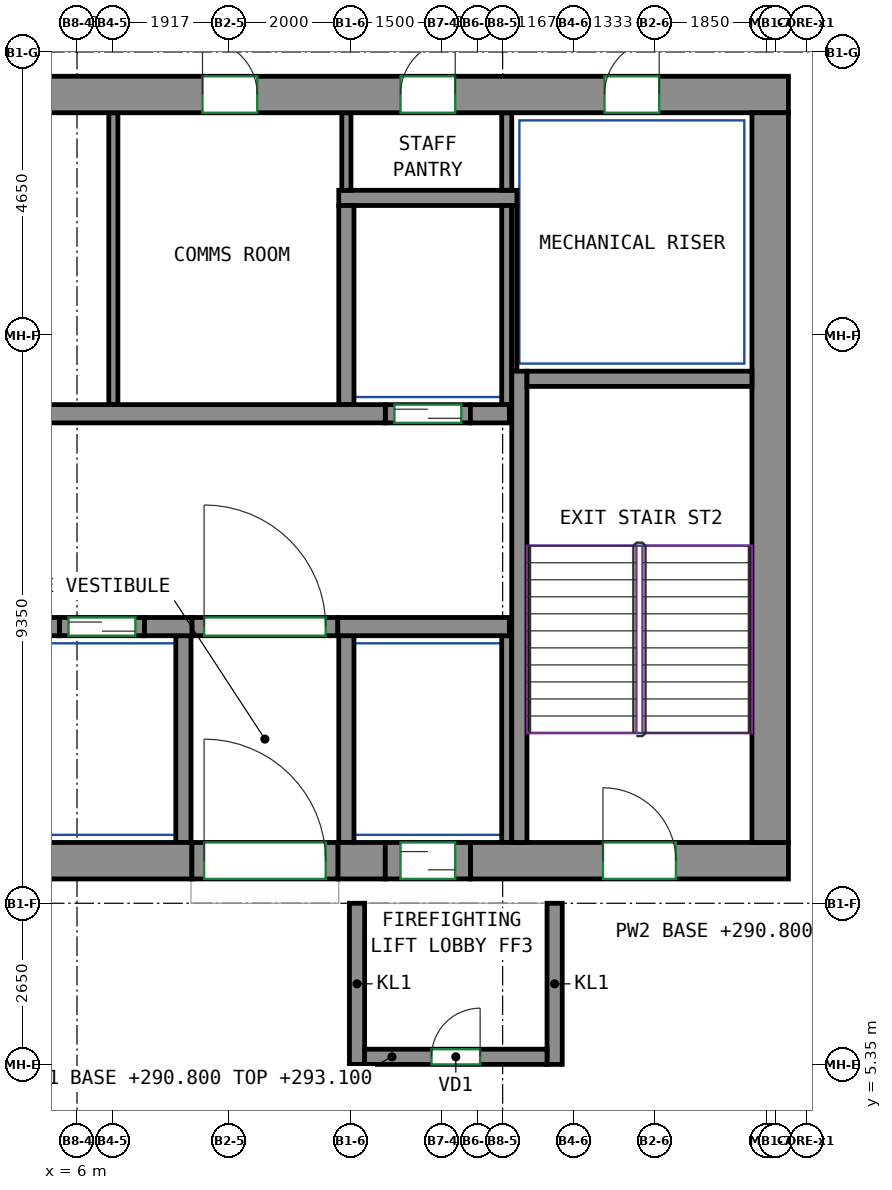
"""IFC4 building model, lengths in metres.
Left out: names, types, materials, properties, quantities, classifications, styles, units other than length and angle.
Written with IfcOpenShell. Run it as: python <this file> out.ifc"""

import sys

from ifc_helpers import new_model, si_unit, direction, frame, frame_2d, origin, place, context, subcontext, project, spatial, rectangle, extrude, source, transform, mapped, element, fill, save


model = new_model("IFC4")
c1 = context("Model", 3, precision=1e-05, world=origin(), true_north=direction((0.0, 1.0)))
c2 = subcontext(c1, "Body", "Model", "MODEL_VIEW")
j1 = project(units=[si_unit("LENGTHUNIT", "METRE"), si_unit("PLANEANGLEUNIT", "RADIAN")], contexts=[c1])
p1 = place(None, origin())
s1 = spatial("IfcSite", under=j1, at=p1, CompositionType="ELEMENT")
p2 = place(p1, origin())
s2 = spatial("IfcBuilding", under=s1, at=p2, CompositionType="ELEMENT")
p3 = place(p2, frame((0.0, 0.0, 290.8)))
s3 = spatial("IfcBuildingStorey", under=s2, at=p3, CompositionType="ELEMENT", Elevation=290.8)
m1 = source(origin(), c2, "Body", "SweptSolid", [
    extrude(rectangle(XDim=14.18, YDim=0.6, at=frame_2d((7.09, 0.0))), origin(), (0.0, 0.0, 1.0), 3.8),
])
p4 = place(p3, frame((-6.29, 8.7, 0.0), z_axis=(0.0, 0.0, 1.0), x_axis=(1.0, 0.0, 0.0)))
e1 = element("IfcWall", 1, at=p4, inside=s3, PredefinedType="SHEAR", context=c2, shape_type="MappedRepresentation", body=[
    mapped(m1, transform((0.0, 0.0, 0.0))),
])
m2 = source(origin(), c2, "Body", "SweptSolid", [
    extrude(rectangle(XDim=0.78, YDim=0.6, at=frame_2d((0.39, 0.0))), origin(), (0.0, 0.0, 1.0), 3.8),
])
p5 = place(p3, frame((10.29, 8.7, 0.0), z_axis=(0.0, 0.0, 1.0), x_axis=(1.0, 0.0, 0.0)))
e2 = element("IfcWall", 2, at=p5, inside=s3, PredefinedType="SHEAR", context=c2, shape_type="MappedRepresentation", body=[
    mapped(m2, transform((0.0, 0.0, 0.0))),
])
m3 = source(origin(), c2, "Body", "SweptSolid", [
    extrude(rectangle(XDim=5.23, YDim=0.6, at=frame_2d((2.615, 0.0))), origin(), (0.0, 0.0, 1.0), 3.8),
])
p6 = place(p3, frame((12.47, 8.7, 0.0), z_axis=(0.0, 0.0, 1.0), x_axis=(1.0, 0.0, 0.0)))
e3 = element("IfcWall", 3, at=p6, inside=s3, PredefinedType="SHEAR", context=c2, shape_type="MappedRepresentation", body=[
    mapped(m3, transform((0.0, 0.0, 0.0))),
])
p7 = place(p6, frame((2.18, 0.0, 0.0)))
e4 = element("IfcOpeningElement", 4, at=p7, cuts=e3, PredefinedType="OPENING", context=c2, shape_type="SweptSolid", body=[
    extrude(rectangle(XDim=1.2, YDim=2.1, at=frame_2d((0.6, 1.05))), frame((0.0, 0.31, 0.0), z_axis=(0.0, -1.0, 0.0), x_axis=(1.0, 0.0, 0.0)), (0.0, 0.0, 1.0), 0.62),
])
m4 = source(origin(), c2, "Body", "SweptSolid", [
    extrude(rectangle(XDim=33.3, YDim=0.6, at=frame_2d((16.65, 0.0))), origin(), (0.0, 0.0, 1.0), 3.8),
])
p8 = place(p3, frame((-15.6, 21.3, 0.0), z_axis=(0.0, 0.0, 1.0), x_axis=(1.0, 0.0, 0.0)))
e5 = element("IfcWall", 5, at=p8, inside=s3, PredefinedType="SHEAR", context=c2, shape_type="MappedRepresentation", body=[
    mapped(m4, transform((0.0, 0.0, 0.0))),
])
p9 = place(p8, frame((8.12, 0.0, 0.0)))
e6 = element("IfcOpeningElement", 6, at=p9, cuts=e5, PredefinedType="OPENING", context=c2, shape_type="SweptSolid", body=[
    extrude(rectangle(XDim=0.9, YDim=2.1, at=frame_2d((0.45, 1.05))), frame((0.0, 0.31, 0.0), z_axis=(0.0, -1.0, 0.0), x_axis=(1.0, 0.0, 0.0)), (0.0, 0.0, 1.0), 0.62),
])
p10 = place(p8, frame((14.15, 0.0, 0.0)))
e7 = element("IfcOpeningElement", 7, at=p10, cuts=e5, PredefinedType="OPENING", context=c2, shape_type="SweptSolid", body=[
    extrude(rectangle(XDim=0.9, YDim=2.1, at=frame_2d((0.45, 1.05))), frame((0.0, 0.31, 0.0), z_axis=(0.0, -1.0, 0.0), x_axis=(1.0, 0.0, 0.0)), (0.0, 0.0, 1.0), 0.62),
])
p11 = place(p8, frame((18.974, 0.0, 0.0)))
e8 = element("IfcOpeningElement", 8, at=p11, cuts=e5, PredefinedType="OPENING", context=c2, shape_type="SweptSolid", body=[
    extrude(rectangle(XDim=0.9, YDim=2.1, at=frame_2d((0.45, 1.05))), frame((0.0, 0.31, 0.0), z_axis=(0.0, -1.0, 0.0), x_axis=(1.0, 0.0, 0.0)), (0.0, 0.0, 1.0), 0.62),
])
p12 = place(p8, frame((23.664, 0.0, 0.0)))
e9 = element("IfcOpeningElement", 9, at=p12, cuts=e5, PredefinedType="OPENING", context=c2, shape_type="SweptSolid", body=[
    extrude(rectangle(XDim=0.9, YDim=2.1, at=frame_2d((0.45, 1.05))), frame((0.0, 0.31, 0.0), z_axis=(0.0, -1.0, 0.0), x_axis=(1.0, 0.0, 0.0)), (0.0, 0.0, 1.0), 0.62),
])
p13 = place(p8, frame((26.92, 0.0, 0.0)))
e10 = element("IfcOpeningElement", 10, at=p13, cuts=e5, PredefinedType="OPENING", context=c2, shape_type="SweptSolid", body=[
    extrude(rectangle(XDim=0.9, YDim=2.1, at=frame_2d((0.45, 1.05))), frame((0.0, 0.31, 0.0), z_axis=(0.0, -1.0, 0.0), x_axis=(1.0, 0.0, 0.0)), (0.0, 0.0, 1.0), 0.62),
])
p14 = place(p8, frame((2.125, 0.0, 0.0)))
e11 = element("IfcOpeningElement", 11, at=p14, cuts=e5, PredefinedType="OPENING", context=c2, shape_type="SweptSolid", body=[
    extrude(rectangle(XDim=0.9, YDim=2.1, at=frame_2d((0.45, 1.05))), frame((0.0, 0.31, 0.0), z_axis=(0.0, -1.0, 0.0), x_axis=(1.0, 0.0, 0.0)), (0.0, 0.0, 1.0), 0.62),
])
p15 = place(p8, frame((30.275, 0.0, 0.0)))
e12 = element("IfcOpeningElement", 12, at=p15, cuts=e5, PredefinedType="OPENING", context=c2, shape_type="SweptSolid", body=[
    extrude(rectangle(XDim=0.9, YDim=2.1, at=frame_2d((0.45, 1.05))), frame((0.0, 0.31, 0.0), z_axis=(0.0, -1.0, 0.0), x_axis=(1.0, 0.0, 0.0)), (0.0, 0.0, 1.0), 0.62),
])
m5 = source(origin(), c2, "Body", "SweptSolid", [
    extrude(rectangle(XDim=12.0, YDim=0.6, at=frame_2d((6.0, 0.0))), origin(), (0.0, 0.0, 1.0), 3.8),
])
p16 = place(p3, frame((17.4, 9.0, 0.0), z_axis=(0.0, 0.0, 1.0), x_axis=(0.0, 1.0, 0.0)))
e13 = element("IfcWall", 13, at=p16, inside=s3, PredefinedType="SHEAR", context=c2, shape_type="MappedRepresentation", body=[
    mapped(m5, transform((0.0, 0.0, 0.0))),
])
m6 = source(origin(), c2, "Body", "SweptSolid", [
    extrude(rectangle(XDim=7.75, YDim=0.25, at=frame_2d((3.875, 0.0))), origin(), (0.0, 0.0, 1.0), 3.8),
])
p17 = place(p3, frame((13.275, 9.0, 0.0), z_axis=(0.0, 0.0, 1.0), x_axis=(0.0, 1.0, 0.0)))
e14 = element("IfcWall", 14, at=p17, inside=s3, PredefinedType="SHEAR", context=c2, shape_type="MappedRepresentation", body=[
    mapped(m6, transform((0.0, 0.0, 0.0))),
])
m7 = source(origin(), c2, "Body", "SweptSolid", [
    extrude(rectangle(XDim=3.7, YDim=0.25, at=frame_2d((1.85, 0.0))), origin(), (0.0, 0.0, 1.0), 3.8),
])
p18 = place(p3, frame((13.4, 16.625, 0.0), z_axis=(0.0, 0.0, 1.0), x_axis=(1.0, 0.0, 0.0)))
e15 = element("IfcWall", 15, at=p18, inside=s3, PredefinedType="SHEAR", context=c2, shape_type="MappedRepresentation", body=[
    mapped(m7, transform((0.0, 0.0, 0.0))),
])
m8 = source(origin(), c2, "Body", "SweptSolid", [
    extrude(rectangle(XDim=1.28, YDim=0.3, at=frame_2d((0.64, 0.0))), origin(), (0.0, 0.0, 1.0), 3.8),
])
p19 = place(p3, frame((4.43, 12.55, 0.0), z_axis=(0.0, 0.0, 1.0), x_axis=(1.0, 0.0, 0.0)))
e16 = element("IfcWall", 16, at=p19, inside=s3, PredefinedType="SHEAR", context=c2, shape_type="MappedRepresentation", body=[
    mapped(m8, transform((0.0, 0.0, 0.0))),
])
m9 = source(origin(), c2, "Body", "SweptSolid", [
    extrude(rectangle(XDim=0.78, YDim=0.3, at=frame_2d((0.39, 0.0))), origin(), (0.0, 0.0, 1.0), 3.8),
])
p20 = place(p3, frame((7.11, 12.55, 0.0), z_axis=(0.0, 0.0, 1.0), x_axis=(1.0, 0.0, 0.0)))
e17 = element("IfcWall", 17, at=p20, inside=s3, PredefinedType="SHEAR", context=c2, shape_type="MappedRepresentation", body=[
    mapped(m9, transform((0.0, 0.0, 0.0))),
])
m10 = source(origin(), c2, "Body", "SweptSolid", [
    extrude(rectangle(XDim=2.82, YDim=0.3, at=frame_2d((1.41, 0.0))), origin(), (0.0, 0.0, 1.0), 3.8),
])
p21 = place(p3, frame((10.29, 12.55, 0.0), z_axis=(0.0, 0.0, 1.0), x_axis=(1.0, 0.0, 0.0)))
e18 = element("IfcWall", 18, at=p21, inside=s3, PredefinedType="SHEAR", context=c2, shape_type="MappedRepresentation", body=[
    mapped(m10, transform((0.0, 0.0, 0.0))),
])
m11 = source(origin(), c2, "Body", "SweptSolid", [
    extrude(rectangle(XDim=22.08, YDim=0.3, at=frame_2d((11.04, 0.0))), origin(), (0.0, 0.0, 1.0), 3.8),
])
p22 = place(p3, frame((-11.01, 16.05, 0.0), z_axis=(0.0, 0.0, 1.0), x_axis=(1.0, 0.0, 0.0)))
e19 = element("IfcWall", 19, at=p22, inside=s3, PredefinedType="SHEAR", context=c2, shape_type="MappedRepresentation", body=[
    mapped(m11, transform((0.0, 0.0, 0.0))),
])
m12 = source(origin(), c2, "Body", "SweptSolid", [
    extrude(rectangle(XDim=0.64, YDim=0.3, at=frame_2d((0.32, 0.0))), origin(), (0.0, 0.0, 1.0), 3.8),
])
p23 = place(p3, frame((12.47, 16.05, 0.0), z_axis=(0.0, 0.0, 1.0), x_axis=(1.0, 0.0, 0.0)))
e20 = element("IfcWall", 20, at=p23, inside=s3, PredefinedType="SHEAR", context=c2, shape_type="MappedRepresentation", body=[
    mapped(m12, transform((0.0, 0.0, 0.0))),
])
m13 = source(origin(), c2, "Body", "SweptSolid", [
    extrude(rectangle(XDim=1.4, YDim=0.3, at=frame_2d((0.7, 0.0))), origin(), (0.0, 0.0, 1.0), 3.8),
])
p24 = place(p3, frame((5.71, 12.55, 0.0), z_axis=(0.0, 0.0, 1.0), x_axis=(1.0, 0.0, 0.0)))
e21 = element("IfcWall", 21, at=p24, inside=s3, PredefinedType="PARTITIONING", context=c2, shape_type="MappedRepresentation", body=[
    mapped(m13, transform((0.0, 0.0, 0.0))),
])
p25 = place(p24, frame((0.15, 0.0, 0.0)))
e22 = element("IfcOpeningElement", 22, at=p25, cuts=e21, PredefinedType="OPENING", context=c2, shape_type="SweptSolid", body=[
    extrude(rectangle(XDim=1.1, YDim=2.1, at=frame_2d((0.55, 1.05))), frame((0.0, 0.16, 0.0), z_axis=(0.0, -1.0, 0.0), x_axis=(1.0, 0.0, 0.0)), (0.0, 0.0, 1.0), 0.32),
])
m14 = source(origin(), c2, "Body", "SweptSolid", [
    extrude(rectangle(XDim=1.4, YDim=0.3, at=frame_2d((0.7, 0.0))), origin(), (0.0, 0.0, 1.0), 3.8),
])
p26 = place(p3, frame((11.07, 16.05, 0.0), z_axis=(0.0, 0.0, 1.0), x_axis=(1.0, 0.0, 0.0)))
e23 = element("IfcWall", 23, at=p26, inside=s3, PredefinedType="PARTITIONING", context=c2, shape_type="MappedRepresentation", body=[
    mapped(m14, transform((0.0, 0.0, 0.0))),
])
p27 = place(p26, frame((0.15, 0.0, 0.0)))
e24 = element("IfcOpeningElement", 24, at=p27, cuts=e23, PredefinedType="OPENING", context=c2, shape_type="SweptSolid", body=[
    extrude(rectangle(XDim=1.1, YDim=2.1, at=frame_2d((0.55, 1.05))), frame((0.0, 0.16, 0.0), z_axis=(0.0, -1.0, 0.0), x_axis=(1.0, 0.0, 0.0)), (0.0, 0.0, 1.0), 0.32),
])
m15 = source(origin(), c2, "Body", "SweptSolid", [
    extrude(rectangle(XDim=2.4, YDim=0.3, at=frame_2d((1.2, 0.0))), origin(), (0.0, 0.0, 1.0), 3.8),
])
p28 = place(p3, frame((7.89, 12.55, 0.0), z_axis=(0.0, 0.0, 1.0), x_axis=(1.0, 0.0, 0.0)))
e25 = element("IfcWall", 25, at=p28, inside=s3, PredefinedType="PARTITIONING", context=c2, shape_type="MappedRepresentation", body=[
    mapped(m15, transform((0.0, 0.0, 0.0))),
])
p29 = place(p28, frame((0.2, 0.0, 0.0)))
e26 = element("IfcOpeningElement", 26, at=p29, cuts=e25, PredefinedType="OPENING", context=c2, shape_type="SweptSolid", body=[
    extrude(rectangle(XDim=2.0, YDim=2.1, at=frame_2d((1.0, 1.05))), frame((0.0, 0.16, 0.0), z_axis=(0.0, -1.0, 0.0), x_axis=(1.0, 0.0, 0.0)), (0.0, 0.0, 1.0), 0.32),
])
m16 = source(origin(), c2, "Body", "SweptSolid", [
    extrude(rectangle(XDim=2.65, YDim=0.25, at=frame_2d((1.325, 0.0))), origin(), (0.0, 0.0, 1.0), 3.25),
])
for number, where, z_axis, x_axis in (
    (27, (10.605, 5.35, 0.0), (0.0, 0.0, 1.0), (0.0, 1.0, 0.0)),
    (28, (13.855, 5.35, 0.0), (0.0, 0.0, 1.0), (0.0, 1.0, 0.0)),
):
    element("IfcWall", number, at=place(p3, frame(where, z_axis=z_axis, x_axis=x_axis)), inside=s3, PredefinedType="PARTITIONING", context=c2, shape_type="MappedRepresentation", body=[
        mapped(m16, transform((0.0, 0.0, 0.0))),
    ])
m17 = source(origin(), c2, "Body", "SweptSolid", [
    extrude(rectangle(XDim=3.0, YDim=0.25, at=frame_2d((1.5, 0.0))), origin(), (0.0, 0.0, 1.0), 2.3),
])
p30 = place(p3, frame((10.73, 5.475, 0.0), z_axis=(0.0, 0.0, 1.0), x_axis=(1.0, 0.0, 0.0)))
e29 = element("IfcWall", 29, at=p30, inside=s3, PredefinedType="PARTITIONING", context=c2, shape_type="MappedRepresentation", body=[
    mapped(m17, transform((0.0, 0.0, 0.0))),
])
p31 = place(p30, frame((1.1, 0.0, 0.0)))
e30 = element("IfcOpeningElement", 30, at=p31, cuts=e29, PredefinedType="OPENING", context=c2, shape_type="SweptSolid", body=[
    extrude(rectangle(XDim=0.8, YDim=2.0, at=frame_2d((0.4, 1.0))), frame((0.0, 0.135, 0.0), z_axis=(0.0, -1.0, 0.0), x_axis=(1.0, 0.0, 0.0)), (0.0, 0.0, 1.0), 0.27),
])
m18 = source(origin(), c2, "Body", "SweptSolid", [
    extrude(rectangle(XDim=2.93, YDim=0.25, at=frame_2d((1.465, 0.0))), origin(), (0.0, 0.0, 1.0), 3.8),
])
p32 = place(p3, frame((10.305, 19.6, 0.0), z_axis=(0.0, 0.0, 1.0), x_axis=(1.0, 0.0, 0.0)))
e31 = element("IfcWall", 31, at=p32, inside=s3, PredefinedType="PARTITIONING", context=c2, shape_type="MappedRepresentation", body=[
    mapped(m18, transform((0.0, 0.0, 0.0))),
])
m19 = source(origin(), c2, "Body", "SweptSolid", [
    extrude(rectangle(XDim=3.275, YDim=0.165, at=frame_2d((1.638, 0.0))), origin(), (0.0, 0.0, 1.0), 3.8),
])
p33 = place(p3, frame((13.067, 16.2, 0.0), z_axis=(0.0, 0.0, 1.0), x_axis=(0.0, 1.0, 0.0)))
e32 = element("IfcWall", 32, at=p33, inside=s3, PredefinedType="PARTITIONING", context=c2, shape_type="MappedRepresentation", body=[
    mapped(m19, transform((0.0, 0.0, 0.0))),
])
m20 = source(origin(), c2, "Body", "SweptSolid", [
    extrude(rectangle(XDim=1.275, YDim=0.165, at=frame_2d((0.637, 0.0))), origin(), (0.0, 0.0, 1.0), 3.8),
])
p34 = place(p3, frame((13.067, 19.725, 0.0), z_axis=(0.0, 0.0, 1.0), x_axis=(0.0, 1.0, 0.0)))
e33 = element("IfcWall", 33, at=p34, inside=s3, PredefinedType="PARTITIONING", context=c2, shape_type="MappedRepresentation", body=[
    mapped(m20, transform((0.0, 0.0, 0.0))),
])
m21 = source(origin(), c2, "Body", "SweptSolid", [
    extrude(rectangle(XDim=3.275, YDim=0.25, at=frame_2d((1.638, 0.0))), origin(), (0.0, 0.0, 1.0), 3.8),
])
p35 = place(p3, frame((10.43, 16.2, 0.0), z_axis=(0.0, 0.0, 1.0), x_axis=(0.0, 1.0, 0.0)))
e34 = element("IfcWall", 34, at=p35, inside=s3, PredefinedType="PARTITIONING", context=c2, shape_type="MappedRepresentation", body=[
    mapped(m21, transform((0.0, 0.0, 0.0))),
])
m22 = source(origin(), c2, "Body", "SweptSolid", [
    extrude(rectangle(XDim=2.725, YDim=0.085, at=frame_2d((1.363, 0.0))), origin(), (0.0, 0.0, 1.0), 3.8),
])
p36 = place(p3, frame((13.192, 16.75, 0.0), z_axis=(0.0, 0.0, 1.0), x_axis=(0.0, 1.0, 0.0)))
e35 = element("IfcWall", 35, at=p36, inside=s3, PredefinedType="PARTITIONING", context=c2, shape_type="MappedRepresentation", body=[
    mapped(m22, transform((0.0, 0.0, 0.0))),
])
m23 = source(origin(), c2, "Body", "SweptSolid", [
    extrude(rectangle(XDim=3.4, YDim=0.25, at=frame_2d((1.7, 0.0))), origin(), (0.0, 0.0, 1.0), 3.8),
])
p37 = place(p3, frame((10.43, 9.0, 0.0), z_axis=(0.0, 0.0, 1.0), x_axis=(0.0, 1.0, 0.0)))
e36 = element("IfcWall", 36, at=p37, inside=s3, PredefinedType="PARTITIONING", context=c2, shape_type="MappedRepresentation", body=[
    mapped(m23, transform((0.0, 0.0, 0.0))),
])
m24 = source(origin(), c2, "Body", "SweptSolid", [
    extrude(rectangle(XDim=3.4, YDim=0.165, at=frame_2d((1.7, 0.0))), origin(), (0.0, 0.0, 1.0), 3.8),
])
p38 = place(p3, frame((13.067, 9.0, 0.0), z_axis=(0.0, 0.0, 1.0), x_axis=(0.0, 1.0, 0.0)))
e37 = element("IfcWall", 37, at=p38, inside=s3, PredefinedType="PARTITIONING", context=c2, shape_type="MappedRepresentation", body=[
    mapped(m24, transform((0.0, 0.0, 0.0))),
])
p39 = place(p3, frame((7.75, 9.0, 0.0), z_axis=(0.0, 0.0, 1.0), x_axis=(0.0, 1.0, 0.0)))
e38 = element("IfcWall", 38, at=p39, inside=s3, PredefinedType="PARTITIONING", context=c2, shape_type="MappedRepresentation", body=[
    mapped(m23, transform((0.0, 0.0, 0.0))),
])
m25 = source(origin(), c2, "Body", "SweptSolid", [
    extrude(rectangle(XDim=4.8, YDim=0.15, at=frame_2d((2.4, 0.0))), origin(), (0.0, 0.0, 1.0), 3.8),
])
p40 = place(p3, frame((6.598, 16.2, 0.0), z_axis=(0.0, 0.0, 1.0), x_axis=(0.0, 1.0, 0.0)))
e39 = element("IfcWall", 39, at=p40, inside=s3, PredefinedType="PARTITIONING", context=c2, shape_type="MappedRepresentation", body=[
    mapped(m25, transform((0.0, 0.0, 0.0))),
])
m26 = source(origin(), c2, "Body", "SweptSolid", [
    extrude(rectangle(XDim=1.275, YDim=0.15, at=frame_2d((0.637, 0.0))), origin(), (0.0, 0.0, 1.0), 3.8),
])
p41 = place(p3, frame((10.43, 19.725, 0.0), z_axis=(0.0, 0.0, 1.0), x_axis=(0.0, 1.0, 0.0)))
e40 = element("IfcWall", 40, at=p41, inside=s3, PredefinedType="PARTITIONING", context=c2, shape_type="MappedRepresentation", body=[
    mapped(m26, transform((0.0, 0.0, 0.0))),
])
m27 = source(origin(), c2, "Body", "SweptSolid", [
    extrude(rectangle(XDim=2.4, YDim=0.6, at=frame_2d((1.2, 0.0))), origin(), (0.0, 0.0, 1.0), 2.7),
])
p42 = place(p3, frame((7.89, 8.7, 0.0), z_axis=(0.0, 0.0, 1.0), x_axis=(1.0, 0.0, 0.0)))
e41 = element("IfcWall", 41, at=p42, inside=s3, PredefinedType="PARTITIONING", context=c2, shape_type="MappedRepresentation", body=[
    mapped(m27, transform((0.0, 0.0, 0.0))),
])
p43 = place(p42, frame((0.2, 0.0, 0.0)))
e42 = element("IfcOpeningElement", 42, at=p43, cuts=e41, PredefinedType="OPENING", context=c2, shape_type="SweptSolid", body=[
    extrude(rectangle(XDim=2.0, YDim=2.1, at=frame_2d((1.0, 1.05))), frame((0.0, 0.31, 0.0), z_axis=(0.0, -1.0, 0.0), x_axis=(1.0, 0.0, 0.0)), (0.0, 0.0, 1.0), 0.62),
])
m28 = source(origin(), c2, "Body", "SweptSolid", [
    extrude(rectangle(XDim=1.4, YDim=0.6, at=frame_2d((0.7, 0.0))), origin(), (0.0, 0.0, 1.0), 2.7),
])
p44 = place(p3, frame((11.07, 8.7, 0.0), z_axis=(0.0, 0.0, 1.0), x_axis=(1.0, 0.0, 0.0)))
e43 = element("IfcWall", 43, at=p44, inside=s3, PredefinedType="PARTITIONING", context=c2, shape_type="MappedRepresentation", body=[
    mapped(m28, transform((0.0, 0.0, 0.0))),
])
p45 = place(p44, frame((0.25, 0.0, 0.0)))
e44 = element("IfcOpeningElement", 44, at=p45, cuts=e43, PredefinedType="OPENING", context=c2, shape_type="SweptSolid", body=[
    extrude(rectangle(XDim=0.9, YDim=2.1, at=frame_2d((0.45, 1.05))), frame((0.0, 0.31, 0.0), z_axis=(0.0, -1.0, 0.0), x_axis=(1.0, 0.0, 0.0)), (0.0, 0.0, 1.0), 0.62),
])
p46 = place(p29, origin())
e45 = element("IfcDoor", 45, at=p46, inside=s3, OperationType="DOUBLE_DOOR_SINGLE_SWING", PredefinedType="DOOR", context=c2, shape_type="SweptSolid", body=[
    extrude(rectangle(XDim=2.0, YDim=2.1, at=frame_2d((1.0, 1.05))), frame((0.0, 0.025, 0.0), z_axis=(0.0, -1.0, 0.0), x_axis=(1.0, 0.0, 0.0)), (0.0, 0.0, 1.0), 0.05),
])
fill(e26, e45)
p47 = place(p43, origin())
e46 = element("IfcDoor", 46, at=p47, inside=s3, OperationType="DOUBLE_DOOR_SINGLE_SWING", PredefinedType="DOOR", context=c2, shape_type="SweptSolid", body=[
    extrude(rectangle(XDim=2.0, YDim=2.1, at=frame_2d((1.0, 1.05))), frame((0.0, 0.205, 0.0), z_axis=(0.0, -1.0, 0.0), x_axis=(1.0, 0.0, 0.0)), (0.0, 0.0, 1.0), 0.05),
])
fill(e42, e46)
p48 = place(p31, origin())
e47 = element("IfcDoor", 47, at=p48, inside=s3, OperationType="SINGLE_SWING_RIGHT", PredefinedType="DOOR", context=c2, shape_type="SweptSolid", body=[
    extrude(rectangle(XDim=0.8, YDim=2.0, at=frame_2d((0.4, 1.0))), frame((0.0, 0.025, 0.0), z_axis=(0.0, -1.0, 0.0), x_axis=(1.0, 0.0, 0.0)), (0.0, 0.0, 1.0), 0.05),
])
fill(e30, e47)
p49 = place(p45, origin())
e48 = element("IfcDoor", 48, at=p49, inside=s3, OperationType="SLIDING_TO_LEFT", PredefinedType="DOOR", context=c2, shape_type="SweptSolid", body=[
    extrude(rectangle(XDim=0.9, YDim=2.1, at=frame_2d((0.45, 1.05))), frame((0.0, 0.205, 0.0), z_axis=(0.0, -1.0, 0.0), x_axis=(1.0, 0.0, 0.0)), (0.0, 0.0, 1.0), 0.05),
])
fill(e44, e48)
p50 = place(p25, origin())
e49 = element("IfcDoor", 49, at=p50, inside=s3, OperationType="DOUBLE_DOOR_SLIDING", PredefinedType="DOOR", context=c2, shape_type="SweptSolid", body=[
    extrude(rectangle(XDim=1.1, YDim=2.1, at=frame_2d((0.55, 1.05))), frame((0.0, 0.025, 0.0), z_axis=(0.0, -1.0, 0.0), x_axis=(1.0, 0.0, 0.0)), (0.0, 0.0, 1.0), 0.05),
])
fill(e22, e49)
p51 = place(p27, origin())
e50 = element("IfcDoor", 50, at=p51, inside=s3, OperationType="DOUBLE_DOOR_SLIDING", PredefinedType="DOOR", context=c2, shape_type="SweptSolid", body=[
    extrude(rectangle(XDim=1.1, YDim=2.1, at=frame_2d((0.55, 1.05))), frame((0.0, 0.025, 0.0), z_axis=(0.0, -1.0, 0.0), x_axis=(1.0, 0.0, 0.0)), (0.0, 0.0, 1.0), 0.05),
])
fill(e24, e50)
p52 = place(p12, origin())
e51 = element("IfcDoor", 51, at=p52, inside=s3, OperationType="SINGLE_SWING_LEFT", PredefinedType="DOOR", context=c2, shape_type="SweptSolid", body=[
    extrude(rectangle(XDim=0.9, YDim=2.1, at=frame_2d((0.45, 1.05))), frame((0.0, -0.155, 0.0), z_axis=(0.0, -1.0, 0.0), x_axis=(1.0, 0.0, 0.0)), (0.0, 0.0, 1.0), 0.05),
])
fill(e9, e51)
p53 = place(p13, origin())
e52 = element("IfcDoor", 52, at=p53, inside=s3, OperationType="SINGLE_SWING_RIGHT", PredefinedType="DOOR", context=c2, shape_type="SweptSolid", body=[
    extrude(rectangle(XDim=0.9, YDim=2.1, at=frame_2d((0.45, 1.05))), frame((0.0, -0.155, 0.0), z_axis=(0.0, -1.0, 0.0), x_axis=(1.0, 0.0, 0.0)), (0.0, 0.0, 1.0), 0.05),
])
fill(e10, e52)
p54 = place(p15, origin())
e53 = element("IfcDoor", 53, at=p54, inside=s3, OperationType="SINGLE_SWING_RIGHT", PredefinedType="DOOR", context=c2, shape_type="SweptSolid", body=[
    extrude(rectangle(XDim=0.9, YDim=2.1, at=frame_2d((0.45, 1.05))), frame((0.0, -0.155, 0.0), z_axis=(0.0, -1.0, 0.0), x_axis=(1.0, 0.0, 0.0)), (0.0, 0.0, 1.0), 0.05),
])
fill(e12, e53)
p55 = place(p7, origin())
e54 = element("IfcDoor", 54, at=p55, inside=s3, OperationType="DOUBLE_DOOR_SINGLE_SWING", PredefinedType="DOOR", context=c2, shape_type="SweptSolid", body=[
    extrude(rectangle(XDim=1.2, YDim=2.1, at=frame_2d((0.6, 1.05))), frame((0.0, 0.205, 0.0), z_axis=(0.0, -1.0, 0.0), x_axis=(1.0, 0.0, 0.0)), (0.0, 0.0, 1.0), 0.05),
])
fill(e4, e54)
save(model, sys.argv[1])
